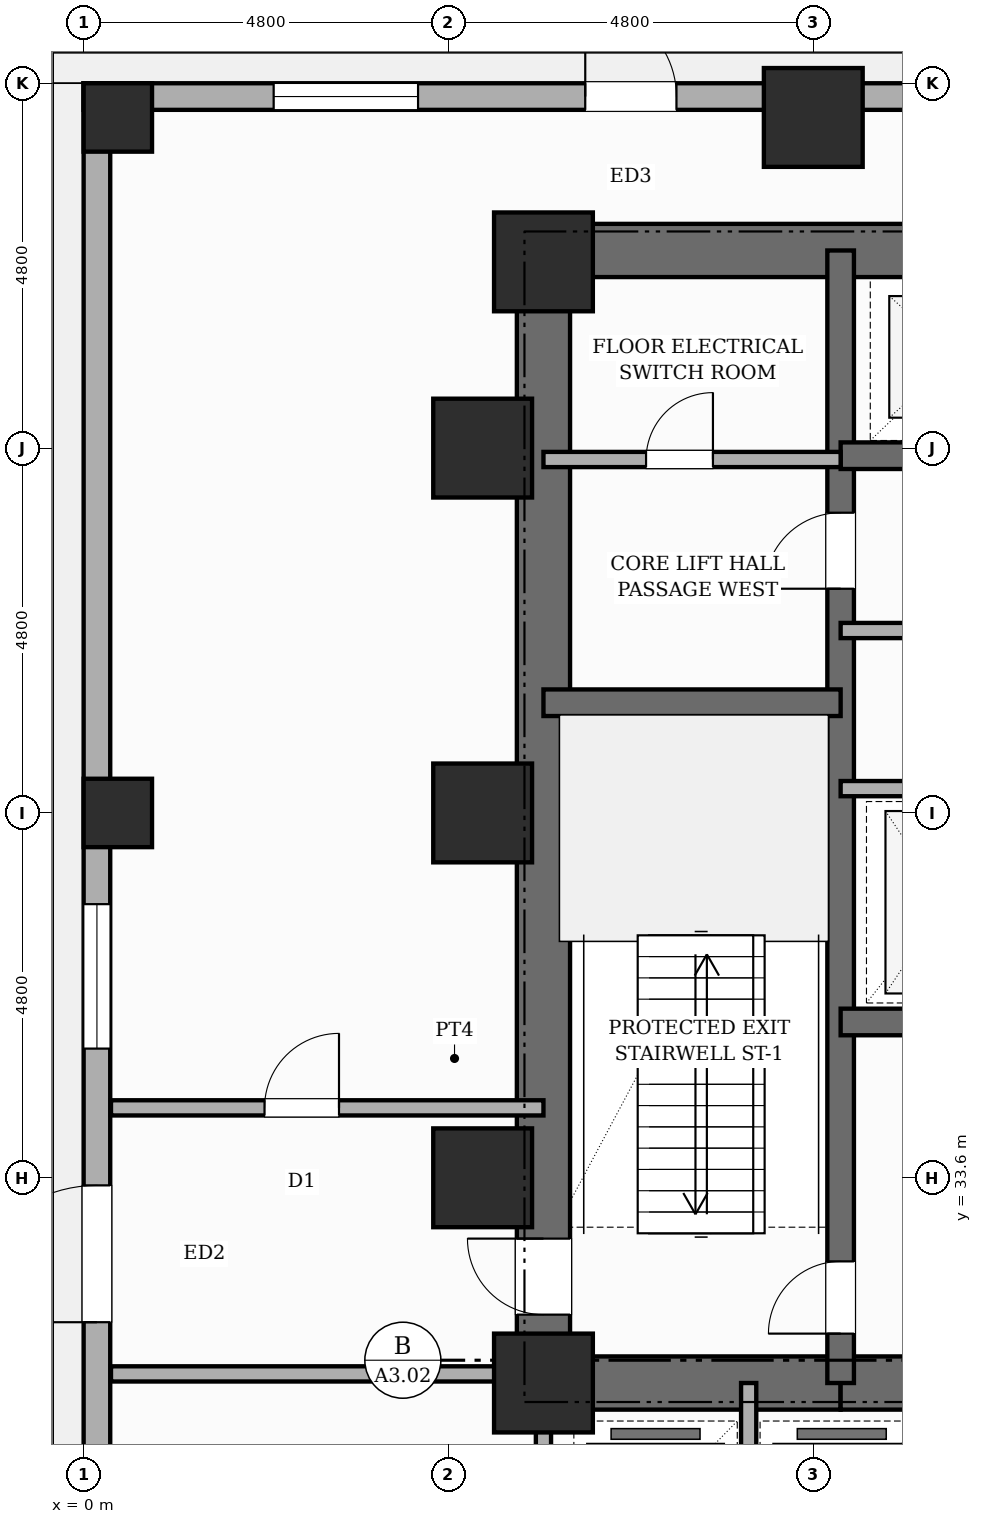
"""IFC4 building model, lengths in metres.
Left out: names, types, materials, properties, quantities, classifications, styles, units other than length and angle.
Written with IfcOpenShell. Run it as: python <this file> out.ifc"""

import sys

from ifc_helpers import new_model, si_unit, direction, frame, frame_2d, origin, origin_2d, place, context, subcontext, project, spatial, rectangle, circle, extrude, element, fill, save


model = new_model("IFC4")
c1 = context("Model", 3, precision=1e-05, world=origin(), true_north=direction((0.0, 1.0)))
c2 = subcontext(c1, "Body", "Model", "MODEL_VIEW")
j1 = project(units=[si_unit("LENGTHUNIT", "METRE"), si_unit("PLANEANGLEUNIT", "RADIAN")], contexts=[c1])
p1 = place(None, origin())
s1 = spatial("IfcSite", under=j1, at=p1, CompositionType="ELEMENT")
p2 = place(p1, origin())
s2 = spatial("IfcBuilding", under=s1, at=p2, CompositionType="ELEMENT")
p3 = place(p2, origin())
s3 = spatial("IfcBuildingStorey", under=s2, at=p3, CompositionType="ELEMENT", Elevation=0.0)
p4 = place(p3, frame((6.05, 30.55, 0.0), z_axis=(0.0, 0.0, 1.0), x_axis=(0.0, 1.0, 0.0)))
e1 = element("IfcWall", 1, at=p4, inside=s3, PredefinedType="SHEAR", context=c2, shape_type="SweptSolid", body=[
    extrude(rectangle(XDim=15.6, YDim=0.7, at=frame_2d((7.8, 0.0))), origin(), (0.0, 0.0, 1.0), 5.2),
])
p5 = place(p4, frame((1.25, 0.0, 0.0)))
e2 = element("IfcOpeningElement", 2, at=p5, cuts=e1, PredefinedType="OPENING", context=c2, shape_type="SweptSolid", body=[
    extrude(rectangle(XDim=1.0, YDim=2.15, at=frame_2d((0.5, 1.075))), frame((0.0, 0.36, 0.0), z_axis=(0.0, -1.0, 0.0), x_axis=(1.0, 0.0, 0.0)), (0.0, 0.0, 1.0), 0.72),
])
p6 = place(p3, frame((6.05, 45.8, 0.0), z_axis=(0.0, 0.0, 1.0), x_axis=(1.0, 0.0, 0.0)))
e3 = element("IfcWall", 3, at=p6, inside=s3, PredefinedType="SHEAR", context=c2, shape_type="SweptSolid", body=[
    extrude(rectangle(XDim=16.7, YDim=0.7, at=frame_2d((8.35, 0.0))), origin(), (0.0, 0.0, 1.0), 5.2),
])
p7 = place(p3, frame((6.05, 30.9, 0.0), z_axis=(0.0, 0.0, 1.0), x_axis=(1.0, 0.0, 0.0)))
e4 = element("IfcWall", 4, at=p7, inside=s3, PredefinedType="SHEAR", context=c2, shape_type="SweptSolid", body=[
    extrude(rectangle(XDim=3.91, YDim=0.7, at=frame_2d((1.955, 0.0))), origin(), (0.0, 0.0, 1.0), 5.2),
])
p8 = place(p3, frame((9.96, 30.9, 0.0), z_axis=(0.0, 0.0, 1.0), x_axis=(1.0, 0.0, 0.0)))
e5 = element("IfcWall", 5, at=p8, inside=s3, PredefinedType="SHEAR", context=c2, shape_type="SweptSolid", body=[
    extrude(rectangle(XDim=8.88, YDim=0.7, at=frame_2d((4.44, 0.0))), origin(), (0.0, 0.0, 1.0), 5.2),
])
p9 = place(p8, frame((4.09, 0.0, 0.0)))
e6 = element("IfcOpeningElement", 6, at=p9, cuts=e5, PredefinedType="OPENING", context=c2, shape_type="SweptSolid", body=[
    extrude(rectangle(XDim=1.0, YDim=2.15, at=frame_2d((0.5, 1.075))), frame((0.0, 0.36, 0.0), z_axis=(0.0, -1.0, 0.0), x_axis=(1.0, 0.0, 0.0)), (0.0, 0.0, 1.0), 0.72),
])
p10 = place(p3, frame((9.96, 30.9, 0.0), z_axis=(0.0, 0.0, 1.0), x_axis=(0.0, 1.0, 0.0)))
e7 = element("IfcWall", 7, at=p10, inside=s3, PredefinedType="SHEAR", context=c2, shape_type="SweptSolid", body=[
    extrude(rectangle(XDim=14.9, YDim=0.35, at=frame_2d((7.45, 0.0))), origin(), (0.0, 0.0, 1.0), 5.2),
])
p11 = place(p10, frame((0.65, 0.0, 0.0)))
e8 = element("IfcOpeningElement", 8, at=p11, cuts=e7, PredefinedType="OPENING", context=c2, shape_type="SweptSolid", body=[
    extrude(rectangle(XDim=0.95, YDim=2.1, at=frame_2d((0.475, 1.05))), frame((0.0, 0.185, 0.0), z_axis=(0.0, -1.0, 0.0), x_axis=(1.0, 0.0, 0.0)), (0.0, 0.0, 1.0), 0.37),
])
p12 = place(p10, frame((10.45, 0.0, 0.0)))
e9 = element("IfcOpeningElement", 9, at=p12, cuts=e7, PredefinedType="OPENING", context=c2, shape_type="SweptSolid", body=[
    extrude(rectangle(XDim=1.0, YDim=2.15, at=frame_2d((0.5, 1.075))), frame((0.0, 0.185, 0.0), z_axis=(0.0, -1.0, 0.0), x_axis=(1.0, 0.0, 0.0)), (0.0, 0.0, 1.0), 0.37),
])
p13 = place(p3, frame((6.05, 39.85, 0.0), z_axis=(0.0, 0.0, 1.0), x_axis=(1.0, 0.0, 0.0)))
e10 = element("IfcWall", 10, at=p13, inside=s3, PredefinedType="SHEAR", context=c2, shape_type="SweptSolid", body=[
    extrude(rectangle(XDim=3.91, YDim=0.35, at=frame_2d((1.955, 0.0))), origin(), (0.0, 0.0, 1.0), 5.2),
])
p14 = place(p3, frame((9.96, 35.65, 0.0), z_axis=(0.0, 0.0, 1.0), x_axis=(1.0, 0.0, 0.0)))
e11 = element("IfcWall", 11, at=p14, inside=s3, PredefinedType="SHEAR", context=c2, shape_type="SweptSolid", body=[
    extrude(rectangle(XDim=8.88, YDim=0.35, at=frame_2d((4.44, 0.0))), origin(), (0.0, 0.0, 1.0), 5.2),
])
p15 = place(p14, frame((0.84, 0.0, 0.0)))
e12 = element("IfcOpeningElement", 12, at=p15, cuts=e11, PredefinedType="OPENING", context=c2, shape_type="SweptSolid", body=[
    extrude(rectangle(XDim=1.1, YDim=2.15, at=frame_2d((0.55, 1.075))), frame((0.0, 0.185, 0.0), z_axis=(0.0, -1.0, 0.0), x_axis=(1.0, 0.0, 0.0)), (0.0, 0.0, 1.0), 0.37),
])
p16 = place(p14, frame((5.24, 0.0, 0.0)))
e13 = element("IfcOpeningElement", 13, at=p16, cuts=e11, PredefinedType="OPENING", context=c2, shape_type="SweptSolid", body=[
    extrude(rectangle(XDim=1.1, YDim=2.15, at=frame_2d((0.55, 1.075))), frame((0.0, 0.185, 0.0), z_axis=(0.0, -1.0, 0.0), x_axis=(1.0, 0.0, 0.0)), (0.0, 0.0, 1.0), 0.37),
])
p17 = place(p14, frame((7.5, 0.0, 0.0)))
e14 = element("IfcOpeningElement", 14, at=p17, cuts=e11, PredefinedType="OPENING", context=c2, shape_type="SweptSolid", body=[
    extrude(rectangle(XDim=0.88, YDim=2.1, at=frame_2d((0.44, 1.05))), frame((0.0, 0.185, 0.0), z_axis=(0.0, -1.0, 0.0), x_axis=(1.0, 0.0, 0.0)), (0.0, 0.0, 1.0), 0.37),
])
p18 = place(p3, frame((9.96, 43.1, 0.0), z_axis=(0.0, 0.0, 1.0), x_axis=(1.0, 0.0, 0.0)))
e15 = element("IfcWall", 15, at=p18, inside=s3, PredefinedType="SHEAR", context=c2, shape_type="SweptSolid", body=[
    extrude(rectangle(XDim=8.88, YDim=0.35, at=frame_2d((4.44, 0.0))), origin(), (0.0, 0.0, 1.0), 5.2),
])
p19 = place(p18, frame((0.99, 0.0, 0.0)))
e16 = element("IfcOpeningElement", 16, at=p19, cuts=e15, PredefinedType="OPENING", context=c2, shape_type="SweptSolid", body=[
    extrude(rectangle(XDim=1.1, YDim=2.15, at=frame_2d((0.55, 1.075))), frame((0.0, 0.185, 0.0), z_axis=(0.0, -1.0, 0.0), x_axis=(1.0, 0.0, 0.0)), (0.0, 0.0, 1.0), 0.37),
])
p20 = place(p18, frame((3.89, 0.0, 0.0)))
e17 = element("IfcOpeningElement", 17, at=p20, cuts=e15, PredefinedType="OPENING", context=c2, shape_type="SweptSolid", body=[
    extrude(rectangle(XDim=1.1, YDim=2.15, at=frame_2d((0.55, 1.075))), frame((0.0, 0.185, 0.0), z_axis=(0.0, -1.0, 0.0), x_axis=(1.0, 0.0, 0.0)), (0.0, 0.0, 1.0), 0.37),
])
p21 = place(p18, frame((6.79, 0.0, 0.0)))
e18 = element("IfcOpeningElement", 18, at=p21, cuts=e15, PredefinedType="OPENING", context=c2, shape_type="SweptSolid", body=[
    extrude(rectangle(XDim=1.1, YDim=2.15, at=frame_2d((0.55, 1.075))), frame((0.0, 0.185, 0.0), z_axis=(0.0, -1.0, 0.0), x_axis=(1.0, 0.0, 0.0)), (0.0, 0.0, 1.0), 0.37),
])
for number, where, z_axis, x_axis in (
    (19, (0.45, 38.4, 0.0), (0.0, 0.0, 1.0), (1.0, 0.0, 0.0)),
    (20, (0.45, 47.55, 0.0), (0.0, 0.0, 1.0), (1.0, 0.0, 0.0)),
):
    element("IfcColumn", number, at=place(p3, frame(where, z_axis=z_axis, x_axis=x_axis)), inside=s3, PredefinedType="COLUMN", context=c2, shape_type="SweptSolid", body=[
        extrude(circle(Radius=0.45, at=origin_2d()), origin(), (0.0, 0.0, 1.0), 5.2),
    ])
for number, where, z_axis, x_axis in (
    (21, (5.25, 33.6, 0.0), (0.0, 0.0, 1.0), (1.0, 0.0, 0.0)),
    (22, (5.25, 38.4, 0.0), (0.0, 0.0, 1.0), (1.0, 0.0, 0.0)),
    (23, (5.25, 43.2, 0.0), (0.0, 0.0, 1.0), (1.0, 0.0, 0.0)),
    (24, (6.05, 30.9, 0.0), (0.0, 0.0, 1.0), (1.0, 0.0, 0.0)),
    (25, (6.05, 45.65, 0.0), (0.0, 0.0, 1.0), (1.0, 0.0, 0.0)),
    (26, (9.6, 47.55, 0.0), (0.0, 0.0, 1.0), (1.0, 0.0, 0.0)),
):
    element("IfcColumn", number, at=place(p3, frame(where, z_axis=z_axis, x_axis=x_axis)), inside=s3, PredefinedType="COLUMN", context=c2, shape_type="SweptSolid", body=[
        extrude(rectangle(XDim=1.3, YDim=1.3, at=origin_2d()), origin(), (0.0, 0.0, 1.0), 5.2),
    ])
p22 = place(p3, frame((0.0, 47.825, 0.0), z_axis=(0.0, 0.0, 1.0), x_axis=(1.0, 0.0, 0.0)))
e27 = element("IfcWall", 27, at=p22, inside=s3, PredefinedType="STANDARD", context=c2, shape_type="SweptSolid", body=[
    extrude(rectangle(XDim=24.0, YDim=0.35, at=frame_2d((12.0, 0.0))), origin(), (0.0, 0.0, 1.0), 3.97),
])
p23 = place(p22, frame((6.6, 0.0, 0.0)))
e28 = element("IfcOpeningElement", 28, at=p23, cuts=e27, PredefinedType="OPENING", context=c2, shape_type="SweptSolid", body=[
    extrude(rectangle(XDim=1.2, YDim=2.25, at=frame_2d((0.6, 1.125))), frame((0.0, 0.185, 0.0), z_axis=(0.0, -1.0, 0.0), x_axis=(1.0, 0.0, 0.0)), (0.0, 0.0, 1.0), 0.37),
])
p24 = place(p22, frame((2.5, 0.0, 0.85)))
e29 = element("IfcOpeningElement", 29, at=p24, cuts=e27, PredefinedType="OPENING", context=c2, shape_type="SweptSolid", body=[
    extrude(rectangle(XDim=1.9, YDim=2.6, at=frame_2d((0.95, 1.3))), frame((0.0, 0.185, 0.0), z_axis=(0.0, -1.0, 0.0), x_axis=(1.0, 0.0, 0.0)), (0.0, 0.0, 1.0), 0.37),
])
p25 = place(p3, frame((0.175, 7.8, 0.0), z_axis=(0.0, 0.0, 1.0), x_axis=(0.0, 1.0, 0.0)))
e30 = element("IfcWall", 30, at=p25, inside=s3, PredefinedType="STANDARD", context=c2, shape_type="SweptSolid", body=[
    extrude(rectangle(XDim=40.2, YDim=0.35, at=frame_2d((20.1, 0.0))), origin(), (0.0, 0.0, 1.0), 3.97),
])
p26 = place(p25, frame((23.9, 0.0, 0.0)))
e31 = element("IfcOpeningElement", 31, at=p26, cuts=e30, PredefinedType="OPENING", context=c2, shape_type="SweptSolid", body=[
    extrude(rectangle(XDim=1.8, YDim=2.3, at=frame_2d((0.9, 1.15))), frame((0.0, 0.185, 0.0), z_axis=(0.0, -1.0, 0.0), x_axis=(1.0, 0.0, 0.0)), (0.0, 0.0, 1.0), 0.37),
])
p27 = place(p25, frame((14.4, 0.0, 0.0)))
e32 = element("IfcOpeningElement", 32, at=p27, cuts=e30, PredefinedType="OPENING", context=c2, shape_type="SweptSolid", body=[
    extrude(rectangle(XDim=1.2, YDim=2.25, at=frame_2d((0.6, 1.125))), frame((0.0, 0.185, 0.0), z_axis=(0.0, -1.0, 0.0), x_axis=(1.0, 0.0, 0.0)), (0.0, 0.0, 1.0), 0.37),
])
p28 = place(p25, frame((7.8, 0.0, 0.85)))
e33 = element("IfcOpeningElement", 33, at=p28, cuts=e30, PredefinedType="OPENING", context=c2, shape_type="SweptSolid", body=[
    extrude(rectangle(XDim=1.9, YDim=2.6, at=frame_2d((0.95, 1.3))), frame((0.0, 0.185, 0.0), z_axis=(0.0, -1.0, 0.0), x_axis=(1.0, 0.0, 0.0)), (0.0, 0.0, 1.0), 0.37),
])
p29 = place(p25, frame((0.525, 0.0, 0.45)))
e34 = element("IfcOpeningElement", 34, at=p29, cuts=e30, PredefinedType="OPENING", context=c2, shape_type="SweptSolid", body=[
    extrude(rectangle(XDim=0.6, YDim=1.8, at=frame_2d((0.3, 0.9))), frame((0.0, 0.185, 0.0), z_axis=(0.0, -1.0, 0.0), x_axis=(1.0, 0.0, 0.0)), (0.0, 0.0, 1.0), 0.37),
])
p30 = place(p25, frame((27.5, 0.0, 0.85)))
e35 = element("IfcOpeningElement", 35, at=p30, cuts=e30, PredefinedType="OPENING", context=c2, shape_type="SweptSolid", body=[
    extrude(rectangle(XDim=1.9, YDim=2.6, at=frame_2d((0.95, 1.3))), frame((0.0, 0.185, 0.0), z_axis=(0.0, -1.0, 0.0), x_axis=(1.0, 0.0, 0.0)), (0.0, 0.0, 1.0), 0.37),
])
p31 = place(p3, frame((9.96, 38.72, 0.0), z_axis=(0.0, 0.0, 1.0), x_axis=(1.0, 0.0, 0.0)))
e36 = element("IfcWall", 36, at=p31, inside=s3, PredefinedType="POLYGONAL", context=c2, shape_type="SweptSolid", body=[
    extrude(rectangle(XDim=7.06, YDim=0.2, at=frame_2d((3.53, 0.0))), origin(), (0.0, 0.0, 1.0), 4.89),
])
p32 = place(p3, frame((9.96, 40.8, 0.0), z_axis=(0.0, 0.0, 1.0), x_axis=(1.0, 0.0, 0.0)))
e37 = element("IfcWall", 37, at=p32, inside=s3, PredefinedType="POLYGONAL", context=c2, shape_type="SweptSolid", body=[
    extrude(rectangle(XDim=8.88, YDim=0.2, at=frame_2d((4.44, 0.0))), origin(), (0.0, 0.0, 1.0), 4.89),
])
p33 = place(p32, frame((7.5, 0.0, 0.0)))
e38 = element("IfcOpeningElement", 38, at=p33, cuts=e37, PredefinedType="OPENING", context=c2, shape_type="SweptSolid", body=[
    extrude(rectangle(XDim=0.88, YDim=2.1, at=frame_2d((0.44, 1.05))), frame((0.0, 0.11, 0.0), z_axis=(0.0, -1.0, 0.0), x_axis=(1.0, 0.0, 0.0)), (0.0, 0.0, 1.0), 0.22),
])
p34 = place(p32, frame((1.7, 0.0, 0.0)))
e39 = element("IfcOpeningElement", 39, at=p34, cuts=e37, PredefinedType="OPENING", context=c2, shape_type="SweptSolid", body=[
    extrude(rectangle(XDim=0.88, YDim=2.1, at=frame_2d((0.44, 1.05))), frame((0.0, 0.11, 0.0), z_axis=(0.0, -1.0, 0.0), x_axis=(1.0, 0.0, 0.0)), (0.0, 0.0, 1.0), 0.22),
])
p35 = place(p32, frame((4.9, 0.0, 0.0)))
e40 = element("IfcOpeningElement", 40, at=p35, cuts=e37, PredefinedType="OPENING", context=c2, shape_type="SweptSolid", body=[
    extrude(rectangle(XDim=0.88, YDim=2.1, at=frame_2d((0.44, 1.05))), frame((0.0, 0.11, 0.0), z_axis=(0.0, -1.0, 0.0), x_axis=(1.0, 0.0, 0.0)), (0.0, 0.0, 1.0), 0.22),
])
p36 = place(p3, frame((6.05, 43.05, 0.0), z_axis=(0.0, 0.0, 1.0), x_axis=(1.0, 0.0, 0.0)))
e41 = element("IfcWall", 41, at=p36, inside=s3, PredefinedType="POLYGONAL", context=c2, shape_type="SweptSolid", body=[
    extrude(rectangle(XDim=3.91, YDim=0.2, at=frame_2d((1.955, 0.0))), origin(), (0.0, 0.0, 1.0), 3.97),
])
p37 = place(p36, frame((1.35, 0.0, 0.0)))
e42 = element("IfcOpeningElement", 42, at=p37, cuts=e41, PredefinedType="OPENING", context=c2, shape_type="SweptSolid", body=[
    extrude(rectangle(XDim=0.88, YDim=2.1, at=frame_2d((0.44, 1.05))), frame((0.0, 0.11, 0.0), z_axis=(0.0, -1.0, 0.0), x_axis=(1.0, 0.0, 0.0)), (0.0, 0.0, 1.0), 0.22),
])
p38 = place(p3, frame((6.05, 27.9, 0.0), z_axis=(0.0, 0.0, 1.0), x_axis=(0.0, 1.0, 0.0)))
e43 = element("IfcWall", 43, at=p38, inside=s3, PredefinedType="POLYGONAL", context=c2, shape_type="SweptSolid", body=[
    extrude(rectangle(XDim=3.0, YDim=0.2, at=frame_2d((1.5, 0.0))), origin(), (0.0, 0.0, 1.0), 4.89),
])
p39 = place(p3, frame((8.75, 28.0, 0.0), z_axis=(0.0, 0.0, 1.0), x_axis=(0.0, 1.0, 0.0)))
e44 = element("IfcWall", 44, at=p39, inside=s3, PredefinedType="POLYGONAL", context=c2, shape_type="SweptSolid", body=[
    extrude(rectangle(XDim=2.9, YDim=0.2, at=frame_2d((1.45, 0.0))), origin(), (0.0, 0.0, 1.0), 4.89),
])
p40 = place(p3, frame((0.36, 34.52, 0.0), z_axis=(0.0, 0.0, 1.0), x_axis=(1.0, 0.0, 0.0)))
e45 = element("IfcWall", 45, at=p40, inside=s3, PredefinedType="PARTITIONING", context=c2, shape_type="SweptSolid", body=[
    extrude(rectangle(XDim=5.69, YDim=0.2, at=frame_2d((2.845, 0.0))), origin(), (0.0, 0.0, 1.0), 4.89),
])
p41 = place(p40, frame((2.02, 0.0, 0.0)))
e46 = element("IfcOpeningElement", 46, at=p41, cuts=e45, PredefinedType="OPENING", context=c2, shape_type="SweptSolid", body=[
    extrude(rectangle(XDim=0.98, YDim=2.18, at=frame_2d((0.49, 1.09))), frame((0.0, 0.11, 0.0), z_axis=(0.0, -1.0, 0.0), x_axis=(1.0, 0.0, 0.0)), (0.0, 0.0, 1.0), 0.22),
])
p42 = place(p3, frame((0.36, 31.02, 0.0), z_axis=(0.0, 0.0, 1.0), x_axis=(1.0, 0.0, 0.0)))
e47 = element("IfcWall", 47, at=p42, inside=s3, PredefinedType="PARTITIONING", context=c2, shape_type="SweptSolid", body=[
    extrude(rectangle(XDim=5.69, YDim=0.2, at=frame_2d((2.845, 0.0))), origin(), (0.0, 0.0, 1.0), 4.89),
])
p43 = place(p23, origin())
e48 = element("IfcDoor", 48, at=p43, inside=s3, OperationType="SINGLE_SWING_LEFT", PredefinedType="DOOR", context=c2, shape_type="SweptSolid", body=[
    extrude(rectangle(XDim=1.2, YDim=2.25, at=frame_2d((0.6, 1.125))), frame((0.0, 0.025, 0.0), z_axis=(0.0, -1.0, 0.0), x_axis=(1.0, 0.0, 0.0)), (0.0, 0.0, 1.0), 0.05),
])
fill(e28, e48)
p44 = place(p24, origin())
e49 = element("IfcWindow", 49, at=p44, inside=s3, PartitioningType="SINGLE_PANEL", PredefinedType="WINDOW", context=c2, shape_type="SweptSolid", body=[
    extrude(rectangle(XDim=1.9, YDim=2.6, at=frame_2d((0.95, 1.3))), frame((0.0, 0.03, 0.0), z_axis=(0.0, -1.0, 0.0), x_axis=(1.0, 0.0, 0.0)), (0.0, 0.0, 1.0), 0.06),
])
fill(e29, e49)
p45 = place(p26, origin())
e50 = element("IfcDoor", 50, at=p45, inside=s3, OperationType="SINGLE_SWING_LEFT", PredefinedType="DOOR", context=c2, shape_type="SweptSolid", body=[
    extrude(rectangle(XDim=1.8, YDim=2.3, at=frame_2d((0.9, 1.15))), frame((0.0, 0.025, 0.0), z_axis=(0.0, -1.0, 0.0), x_axis=(1.0, 0.0, 0.0)), (0.0, 0.0, 1.0), 0.05),
])
fill(e31, e50)
p46 = place(p30, origin())
e51 = element("IfcWindow", 51, at=p46, inside=s3, PartitioningType="SINGLE_PANEL", PredefinedType="WINDOW", context=c2, shape_type="SweptSolid", body=[
    extrude(rectangle(XDim=1.9, YDim=2.6, at=frame_2d((0.95, 1.3))), frame((0.0, 0.03, 0.0), z_axis=(0.0, -1.0, 0.0), x_axis=(1.0, 0.0, 0.0)), (0.0, 0.0, 1.0), 0.06),
])
fill(e35, e51)
p47 = place(p11, origin())
e52 = element("IfcDoor", 52, at=p47, inside=s3, OperationType="SINGLE_SWING_LEFT", PredefinedType="DOOR", context=c2, shape_type="SweptSolid", body=[
    extrude(rectangle(XDim=0.95, YDim=2.1, at=frame_2d((0.475, 1.05))), frame((0.0, 0.025, 0.0), z_axis=(0.0, -1.0, 0.0), x_axis=(1.0, 0.0, 0.0)), (0.0, 0.0, 1.0), 0.05),
])
fill(e8, e52)
p48 = place(p5, origin())
e53 = element("IfcDoor", 53, at=p48, inside=s3, OperationType="SINGLE_SWING_RIGHT", PredefinedType="DOOR", context=c2, shape_type="SweptSolid", body=[
    extrude(rectangle(XDim=1.0, YDim=2.15, at=frame_2d((0.5, 1.075))), frame((0.0, 0.025, 0.0), z_axis=(0.0, -1.0, 0.0), x_axis=(1.0, 0.0, 0.0)), (0.0, 0.0, 1.0), 0.05),
])
fill(e2, e53)
p49 = place(p12, origin())
e54 = element("IfcDoor", 54, at=p49, inside=s3, OperationType="SINGLE_SWING_LEFT", PredefinedType="DOOR", context=c2, shape_type="SweptSolid", body=[
    extrude(rectangle(XDim=1.0, YDim=2.15, at=frame_2d((0.5, 1.075))), frame((0.0, 0.025, 0.0), z_axis=(0.0, -1.0, 0.0), x_axis=(1.0, 0.0, 0.0)), (0.0, 0.0, 1.0), 0.05),
])
fill(e9, e54)
p50 = place(p37, origin())
e55 = element("IfcDoor", 55, at=p50, inside=s3, OperationType="SINGLE_SWING_RIGHT", PredefinedType="DOOR", context=c2, shape_type="SweptSolid", body=[
    extrude(rectangle(XDim=0.88, YDim=2.1, at=frame_2d((0.44, 1.05))), frame((0.0, 0.025, 0.0), z_axis=(0.0, -1.0, 0.0), x_axis=(1.0, 0.0, 0.0)), (0.0, 0.0, 1.0), 0.05),
])
fill(e42, e55)
p51 = place(p41, origin())
e56 = element("IfcDoor", 56, at=p51, inside=s3, OperationType="SINGLE_SWING_RIGHT", PredefinedType="DOOR", context=c2, shape_type="SweptSolid", body=[
    extrude(rectangle(XDim=0.98, YDim=2.18, at=frame_2d((0.49, 1.09))), frame((0.0, 0.025, 0.0), z_axis=(0.0, -1.0, 0.0), x_axis=(1.0, 0.0, 0.0)), (0.0, 0.0, 1.0), 0.05),
])
fill(e46, e56)
save(model, sys.argv[1])
